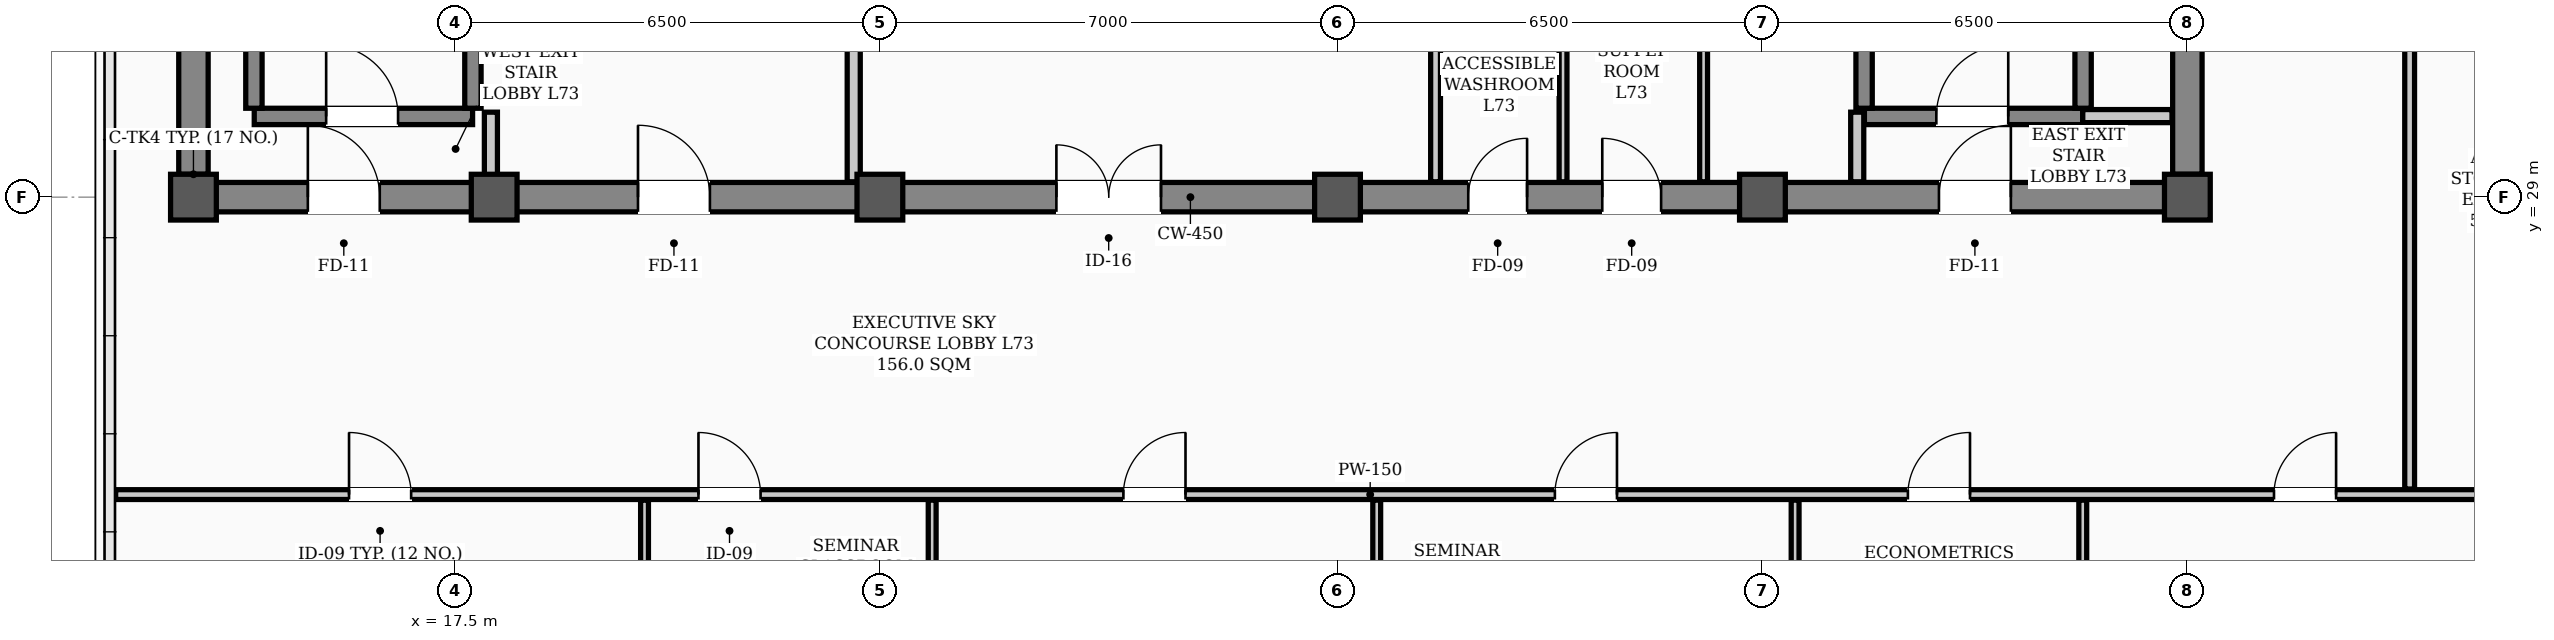
"""IFC4 building model, lengths in metres.
Left out: names, types, materials, properties, quantities, classifications, styles, units other than length and angle.
Written with IfcOpenShell. Run it as: python <this file> out.ifc"""

import sys

from ifc_helpers import new_model, si_unit, direction, frame, frame_2d, origin, origin_2d, place, context, subcontext, project, spatial, rectangle, hollow_rectangle, extrude, element, fill, save


model = new_model("IFC4")
c1 = context("Model", 3, precision=1e-05, world=origin(), true_north=direction((0.0, 1.0)))
c2 = subcontext(c1, "Body", "Model", "MODEL_VIEW")
j1 = project(units=[si_unit("LENGTHUNIT", "METRE"), si_unit("PLANEANGLEUNIT", "RADIAN")], contexts=[c1])
p1 = place(None, origin())
s1 = spatial("IfcSite", under=j1, at=p1, CompositionType="ELEMENT")
p2 = place(p1, origin())
s2 = spatial("IfcBuilding", under=s1, at=p2, CompositionType="ELEMENT")
p3 = place(p2, frame((0.0, 0.0, 293.0)))
s3 = spatial("IfcBuildingStorey", under=s2, at=p3, CompositionType="ELEMENT", Elevation=293.0)
for number, where, z_axis, x_axis in (
    (1, (13.5, 29.0, 0.0), (0.0, 0.0, 1.0), (1.0, 0.0, 0.0)),
    (2, (18.1, 29.0, 0.0), (0.0, 0.0, 1.0), (1.0, 0.0, 0.0)),
    (3, (24.0, 29.0, 0.0), (0.0, 0.0, 1.0), (1.0, 0.0, 0.0)),
    (4, (31.0, 29.0, 0.0), (0.0, 0.0, 1.0), (1.0, 0.0, 0.0)),
    (5, (37.5, 29.0, 0.0), (0.0, 0.0, 1.0), (1.0, 0.0, 0.0)),
    (6, (44.0, 29.0, 0.0), (0.0, 0.0, 1.0), (1.0, 0.0, 0.0)),
):
    element("IfcColumn", number, at=place(p3, frame(where, z_axis=z_axis, x_axis=x_axis)), inside=s3, PredefinedType="COLUMN", context=c2, shape_type="SweptSolid", body=[
        extrude(hollow_rectangle(XDim=0.7, YDim=0.7, WallThickness=0.028, InnerFilletRadius=0.014, OuterFilletRadius=0.042, at=origin_2d()), origin(), (0.0, 0.0, 1.0), 3.9),
    ])
p4 = place(p3, frame((13.5, 29.0, 0.0), z_axis=(0.0, 0.0, 1.0), x_axis=(1.0, 0.0, 0.0)))
e7 = element("IfcWall", 7, at=p4, inside=s3, PredefinedType="SHEAR", context=c2, shape_type="SweptSolid", body=[
    extrude(rectangle(XDim=30.5, YDim=0.45, at=frame_2d((15.25, 0.0))), origin(), (0.0, 0.0, 1.0), 3.72),
])
p5 = place(p4, frame((1.75, 0.0, 0.0)))
e8 = element("IfcOpeningElement", 8, at=p5, cuts=e7, PredefinedType="OPENING", context=c2, shape_type="SweptSolid", body=[
    extrude(rectangle(XDim=1.1, YDim=2.08, at=frame_2d((0.55, 1.04))), frame((0.0, 0.235, 0.0), z_axis=(0.0, -1.0, 0.0), x_axis=(1.0, 0.0, 0.0)), (0.0, 0.0, 1.0), 0.47),
])
p6 = place(p4, frame((26.7, 0.0, 0.0)))
e9 = element("IfcOpeningElement", 9, at=p6, cuts=e7, PredefinedType="OPENING", context=c2, shape_type="SweptSolid", body=[
    extrude(rectangle(XDim=1.1, YDim=2.08, at=frame_2d((0.55, 1.04))), frame((0.0, 0.235, 0.0), z_axis=(0.0, -1.0, 0.0), x_axis=(1.0, 0.0, 0.0)), (0.0, 0.0, 1.0), 0.47),
])
p7 = place(p4, frame((6.8, 0.0, 0.0)))
e10 = element("IfcOpeningElement", 10, at=p7, cuts=e7, PredefinedType="OPENING", context=c2, shape_type="SweptSolid", body=[
    extrude(rectangle(XDim=1.1, YDim=2.08, at=frame_2d((0.55, 1.04))), frame((0.0, 0.235, 0.0), z_axis=(0.0, -1.0, 0.0), x_axis=(1.0, 0.0, 0.0)), (0.0, 0.0, 1.0), 0.47),
])
p8 = place(p4, frame((13.2, 0.0, 0.0)))
e11 = element("IfcOpeningElement", 11, at=p8, cuts=e7, PredefinedType="OPENING", context=c2, shape_type="SweptSolid", body=[
    extrude(rectangle(XDim=1.6, YDim=2.08, at=frame_2d((0.8, 1.04))), frame((0.0, 0.235, 0.0), z_axis=(0.0, -1.0, 0.0), x_axis=(1.0, 0.0, 0.0)), (0.0, 0.0, 1.0), 0.47),
])
p9 = place(p4, frame((19.5, 0.0, 0.0)))
e12 = element("IfcOpeningElement", 12, at=p9, cuts=e7, PredefinedType="OPENING", context=c2, shape_type="SweptSolid", body=[
    extrude(rectangle(XDim=0.9, YDim=2.08, at=frame_2d((0.45, 1.04))), frame((0.0, 0.235, 0.0), z_axis=(0.0, -1.0, 0.0), x_axis=(1.0, 0.0, 0.0)), (0.0, 0.0, 1.0), 0.47),
])
p10 = place(p4, frame((21.55, 0.0, 0.0)))
e13 = element("IfcOpeningElement", 13, at=p10, cuts=e7, PredefinedType="OPENING", context=c2, shape_type="SweptSolid", body=[
    extrude(rectangle(XDim=0.9, YDim=2.08, at=frame_2d((0.45, 1.04))), frame((0.0, 0.235, 0.0), z_axis=(0.0, -1.0, 0.0), x_axis=(1.0, 0.0, 0.0)), (0.0, 0.0, 1.0), 0.47),
])
for number, where, z_axis, x_axis in (
    (14, (13.5, 29.35, 0.0), (0.0, 0.0, 1.0), (0.0, 1.0, 0.0)),
    (15, (44.0, 29.35, 0.0), (0.0, 0.0, 1.0), (0.0, 1.0, 0.0)),
):
    element("IfcWall", number, at=place(p3, frame(where, z_axis=z_axis, x_axis=x_axis)), inside=s3, PredefinedType="SHEAR", context=c2, shape_type="SweptSolid", body=[
        extrude(rectangle(XDim=8.6, YDim=0.45, at=frame_2d((4.3, 0.0))), origin(), (0.0, 0.0, 1.0), 3.72),
    ])
p11 = place(p3, frame((14.43, 30.235, 0.0), z_axis=(0.0, 0.0, 1.0), x_axis=(1.0, 0.0, 0.0)))
e16 = element("IfcWall", 16, at=p11, inside=s3, PredefinedType="STANDARD", context=c2, shape_type="SweptSolid", body=[
    extrude(rectangle(XDim=3.34, YDim=0.25, at=frame_2d((1.67, 0.0))), origin(), (0.0, 0.0, 1.0), 3.72),
])
p12 = place(p11, frame((1.1, 0.0, 0.0)))
e17 = element("IfcOpeningElement", 17, at=p12, cuts=e16, PredefinedType="OPENING", context=c2, shape_type="SweptSolid", body=[
    extrude(rectangle(XDim=1.1, YDim=2.08, at=frame_2d((0.55, 1.04))), frame((0.0, 0.135, 0.0), z_axis=(0.0, -1.0, 0.0), x_axis=(1.0, 0.0, 0.0)), (0.0, 0.0, 1.0), 0.27),
])
for number, where, z_axis, x_axis in (
    (18, (14.425, 30.36, 0.0), (0.0, 0.0, 1.0), (0.0, 1.0, 0.0)),
    (19, (17.775, 30.36, 0.0), (0.0, 0.0, 1.0), (0.0, 1.0, 0.0)),
):
    element("IfcWall", number, at=place(p3, frame(where, z_axis=z_axis, x_axis=x_axis)), inside=s3, PredefinedType="STANDARD", context=c2, shape_type="SweptSolid", body=[
        extrude(rectangle(XDim=7.184, YDim=0.25, at=frame_2d((3.592, 0.0))), origin(), (0.0, 0.0, 1.0), 3.72),
    ])
p13 = place(p3, frame((39.06, 30.235, 0.0), z_axis=(0.0, 0.0, 1.0), x_axis=(1.0, 0.0, 0.0)))
e20 = element("IfcWall", 20, at=p13, inside=s3, PredefinedType="STANDARD", context=c2, shape_type="SweptSolid", body=[
    extrude(rectangle(XDim=3.34, YDim=0.25, at=frame_2d((1.67, 0.0))), origin(), (0.0, 0.0, 1.0), 3.72),
])
p14 = place(p13, frame((1.1, 0.0, 0.0)))
e21 = element("IfcOpeningElement", 21, at=p14, cuts=e20, PredefinedType="OPENING", context=c2, shape_type="SweptSolid", body=[
    extrude(rectangle(XDim=1.1, YDim=2.08, at=frame_2d((0.55, 1.04))), frame((0.0, 0.135, 0.0), z_axis=(0.0, -1.0, 0.0), x_axis=(1.0, 0.0, 0.0)), (0.0, 0.0, 1.0), 0.27),
])
for number, where, z_axis, x_axis in (
    (22, (39.055, 30.36, 0.0), (0.0, 0.0, 1.0), (0.0, 1.0, 0.0)),
    (23, (42.405, 30.36, 0.0), (0.0, 0.0, 1.0), (0.0, 1.0, 0.0)),
):
    element("IfcWall", number, at=place(p3, frame(where, z_axis=z_axis, x_axis=x_axis)), inside=s3, PredefinedType="STANDARD", context=c2, shape_type="SweptSolid", body=[
        extrude(rectangle(XDim=7.184, YDim=0.25, at=frame_2d((3.592, 0.0))), origin(), (0.0, 0.0, 1.0), 3.72),
    ])
p15 = place(p3, frame((42.4, 30.24, 0.0), z_axis=(0.0, 0.0, 1.0), x_axis=(1.0, 0.0, 0.0)))
e24 = element("IfcWall", 24, at=p15, inside=s3, PredefinedType="STANDARD", context=c2, shape_type="SweptSolid", body=[
    extrude(rectangle(XDim=1.365, YDim=0.2, at=frame_2d((0.683, 0.0))), origin(), (0.0, 0.0, 1.0), 3.2),
])
p16 = place(p3, frame((12.31, 24.45, 0.0), z_axis=(0.0, 0.0, 1.0), x_axis=(1.0, 0.0, 0.0)))
e25 = element("IfcWall", 25, at=p16, inside=s3, PredefinedType="PARTITIONING", context=c2, shape_type="SweptSolid", body=[
    extrude(rectangle(XDim=38.38, YDim=0.15, at=frame_2d((19.19, 0.0))), origin(), (0.0, 0.0, 1.0), 3.2),
])
p17 = place(p16, frame((3.57, 0.0, 0.0)))
e26 = element("IfcOpeningElement", 26, at=p17, cuts=e25, PredefinedType="OPENING", context=c2, shape_type="SweptSolid", body=[
    extrude(rectangle(XDim=0.95, YDim=2.08, at=frame_2d((0.475, 1.04))), frame((0.0, 0.085, 0.0), z_axis=(0.0, -1.0, 0.0), x_axis=(1.0, 0.0, 0.0)), (0.0, 0.0, 1.0), 0.17),
])
p18 = place(p16, frame((8.915, 0.0, 0.0)))
e27 = element("IfcOpeningElement", 27, at=p18, cuts=e25, PredefinedType="OPENING", context=c2, shape_type="SweptSolid", body=[
    extrude(rectangle(XDim=0.95, YDim=2.08, at=frame_2d((0.475, 1.04))), frame((0.0, 0.085, 0.0), z_axis=(0.0, -1.0, 0.0), x_axis=(1.0, 0.0, 0.0)), (0.0, 0.0, 1.0), 0.17),
])
p19 = place(p16, frame((15.415, 0.0, 0.0)))
e28 = element("IfcOpeningElement", 28, at=p19, cuts=e25, PredefinedType="OPENING", context=c2, shape_type="SweptSolid", body=[
    extrude(rectangle(XDim=0.95, YDim=2.08, at=frame_2d((0.475, 1.04))), frame((0.0, 0.085, 0.0), z_axis=(0.0, -1.0, 0.0), x_axis=(1.0, 0.0, 0.0)), (0.0, 0.0, 1.0), 0.17),
])
p20 = place(p16, frame((22.015, 0.0, 0.0)))
e29 = element("IfcOpeningElement", 29, at=p20, cuts=e25, PredefinedType="OPENING", context=c2, shape_type="SweptSolid", body=[
    extrude(rectangle(XDim=0.95, YDim=2.08, at=frame_2d((0.475, 1.04))), frame((0.0, 0.085, 0.0), z_axis=(0.0, -1.0, 0.0), x_axis=(1.0, 0.0, 0.0)), (0.0, 0.0, 1.0), 0.17),
])
p21 = place(p16, frame((27.415, 0.0, 0.0)))
e30 = element("IfcOpeningElement", 30, at=p21, cuts=e25, PredefinedType="OPENING", context=c2, shape_type="SweptSolid", body=[
    extrude(rectangle(XDim=0.95, YDim=2.08, at=frame_2d((0.475, 1.04))), frame((0.0, 0.085, 0.0), z_axis=(0.0, -1.0, 0.0), x_axis=(1.0, 0.0, 0.0)), (0.0, 0.0, 1.0), 0.17),
])
p22 = place(p16, frame((33.015, 0.0, 0.0)))
e31 = element("IfcOpeningElement", 31, at=p22, cuts=e25, PredefinedType="OPENING", context=c2, shape_type="SweptSolid", body=[
    extrude(rectangle(XDim=0.95, YDim=2.08, at=frame_2d((0.475, 1.04))), frame((0.0, 0.085, 0.0), z_axis=(0.0, -1.0, 0.0), x_axis=(1.0, 0.0, 0.0)), (0.0, 0.0, 1.0), 0.17),
])
p23 = place(p3, frame((18.05, 29.235, 0.0), z_axis=(0.0, 0.0, 1.0), x_axis=(0.0, 1.0, 0.0)))
e32 = element("IfcWall", 32, at=p23, inside=s3, PredefinedType="STANDARD", context=c2, shape_type="SweptSolid", body=[
    extrude(rectangle(XDim=1.065, YDim=0.2, at=frame_2d((0.532, 0.0))), origin(), (0.0, 0.0, 1.0), 3.72),
])
p24 = place(p3, frame((38.95, 29.235, 0.0), z_axis=(0.0, 0.0, 1.0), x_axis=(0.0, 1.0, 0.0)))
e33 = element("IfcWall", 33, at=p24, inside=s3, PredefinedType="STANDARD", context=c2, shape_type="SweptSolid", body=[
    extrude(rectangle(XDim=1.065, YDim=0.2, at=frame_2d((0.532, 0.0))), origin(), (0.0, 0.0, 1.0), 3.4),
])
p25 = place(p3, frame((23.6, 29.235, 0.0), z_axis=(0.0, 0.0, 1.0), x_axis=(0.0, 1.0, 0.0)))
e34 = element("IfcWall", 34, at=p25, inside=s3, PredefinedType="STANDARD", context=c2, shape_type="SweptSolid", body=[
    extrude(rectangle(XDim=5.465, YDim=0.2, at=frame_2d((2.732, 0.0))), origin(), (0.0, 0.0, 1.0), 3.2),
])
p26 = place(p3, frame((32.5, 29.235, 0.0), z_axis=(0.0, 0.0, 1.0), x_axis=(0.0, 1.0, 0.0)))
e35 = element("IfcWall", 35, at=p26, inside=s3, PredefinedType="PARTITIONING", context=c2, shape_type="SweptSolid", body=[
    extrude(rectangle(XDim=2.53, YDim=0.15, at=frame_2d((1.265, 0.0))), origin(), (0.0, 0.0, 1.0), 3.4),
])
for number, where, z_axis, x_axis in (
    (36, (36.6, 29.235, 0.0), (0.0, 0.0, 1.0), (0.0, 1.0, 0.0)),
    (37, (34.45, 29.235, 0.0), (0.0, 0.0, 1.0), (0.0, 1.0, 0.0)),
):
    element("IfcWall", number, at=place(p3, frame(where, z_axis=z_axis, x_axis=x_axis)), inside=s3, PredefinedType="PARTITIONING", context=c2, shape_type="SweptSolid", body=[
        extrude(rectangle(XDim=2.53, YDim=0.12, at=frame_2d((1.265, 0.0))), origin(), (0.0, 0.0, 1.0), 3.4),
    ])
p27 = place(p3, frame((47.4, 24.535, 0.0), z_axis=(0.0, 0.0, 1.0), x_axis=(0.0, 1.0, 0.0)))
e38 = element("IfcWall", 38, at=p27, inside=s3, PredefinedType="PARTITIONING", context=c2, shape_type="SweptSolid", body=[
    extrude(rectangle(XDim=17.13, YDim=0.15, at=frame_2d((8.565, 0.0))), origin(), (0.0, 0.0, 1.0), 3.1),
])
p28 = place(p27, frame((8.09, 0.0, 0.0)))
e39 = element("IfcOpeningElement", 39, at=p28, cuts=e38, PredefinedType="OPENING", context=c2, shape_type="SweptSolid", body=[
    extrude(rectangle(XDim=0.95, YDim=2.08, at=frame_2d((0.475, 1.04))), frame((0.0, 0.085, 0.0), z_axis=(0.0, -1.0, 0.0), x_axis=(1.0, 0.0, 0.0)), (0.0, 0.0, 1.0), 0.17),
])
p29 = place(p3, frame((20.4, 18.71, 0.0), z_axis=(0.0, 0.0, 1.0), x_axis=(0.0, 1.0, 0.0)))
e40 = element("IfcWall", 40, at=p29, inside=s3, PredefinedType="PARTITIONING", context=c2, shape_type="SweptSolid", body=[
    extrude(rectangle(XDim=5.655, YDim=0.12, at=frame_2d((2.828, 0.0))), origin(), (0.0, 0.0, 1.0), 3.72),
])
p30 = place(p3, frame((24.8, 20.47, 0.0), z_axis=(0.0, 0.0, 1.0), x_axis=(0.0, 1.0, 0.0)))
e41 = element("IfcWall", 41, at=p30, inside=s3, PredefinedType="PARTITIONING", context=c2, shape_type="SweptSolid", body=[
    extrude(rectangle(XDim=3.895, YDim=0.12, at=frame_2d((1.948, 0.0))), origin(), (0.0, 0.0, 1.0), 3.1),
])
for number, where, z_axis, x_axis in (
    (42, (31.6, 18.71, 0.0), (0.0, 0.0, 1.0), (0.0, 1.0, 0.0)),
    (43, (38.0, 18.71, 0.0), (0.0, 0.0, 1.0), (0.0, 1.0, 0.0)),
    (44, (42.4, 18.71, 0.0), (0.0, 0.0, 1.0), (0.0, 1.0, 0.0)),
):
    element("IfcWall", number, at=place(p3, frame(where, z_axis=z_axis, x_axis=x_axis)), inside=s3, PredefinedType="PARTITIONING", context=c2, shape_type="SweptSolid", body=[
        extrude(rectangle(XDim=5.655, YDim=0.12, at=frame_2d((2.828, 0.0))), origin(), (0.0, 0.0, 1.0), 3.1),
    ])
p31 = place(p12, origin())
e45 = element("IfcDoor", 45, at=p31, inside=s3, OperationType="SINGLE_SWING_LEFT", PredefinedType="DOOR", context=c2, shape_type="SweptSolid", body=[
    extrude(rectangle(XDim=1.1, YDim=2.08, at=frame_2d((0.55, 1.04))), frame((0.0, 0.025, 0.0), z_axis=(0.0, -1.0, 0.0), x_axis=(1.0, 0.0, 0.0)), (0.0, 0.0, 1.0), 0.05),
])
fill(e17, e45)
p32 = place(p14, origin())
e46 = element("IfcDoor", 46, at=p32, inside=s3, OperationType="SINGLE_SWING_RIGHT", PredefinedType="DOOR", context=c2, shape_type="SweptSolid", body=[
    extrude(rectangle(XDim=1.1, YDim=2.08, at=frame_2d((0.55, 1.04))), frame((0.0, 0.025, 0.0), z_axis=(0.0, -1.0, 0.0), x_axis=(1.0, 0.0, 0.0)), (0.0, 0.0, 1.0), 0.05),
])
fill(e21, e46)
p33 = place(p5, origin())
e47 = element("IfcDoor", 47, at=p33, inside=s3, OperationType="SINGLE_SWING_LEFT", PredefinedType="DOOR", context=c2, shape_type="SweptSolid", body=[
    extrude(rectangle(XDim=1.1, YDim=2.08, at=frame_2d((0.55, 1.04))), frame((0.0, 0.025, 0.0), z_axis=(0.0, -1.0, 0.0), x_axis=(1.0, 0.0, 0.0)), (0.0, 0.0, 1.0), 0.05),
])
fill(e8, e47)
p34 = place(p6, origin())
e48 = element("IfcDoor", 48, at=p34, inside=s3, OperationType="SINGLE_SWING_RIGHT", PredefinedType="DOOR", context=c2, shape_type="SweptSolid", body=[
    extrude(rectangle(XDim=1.1, YDim=2.08, at=frame_2d((0.55, 1.04))), frame((0.0, 0.025, 0.0), z_axis=(0.0, -1.0, 0.0), x_axis=(1.0, 0.0, 0.0)), (0.0, 0.0, 1.0), 0.05),
])
fill(e9, e48)
p35 = place(p7, origin())
e49 = element("IfcDoor", 49, at=p35, inside=s3, OperationType="SINGLE_SWING_LEFT", PredefinedType="DOOR", context=c2, shape_type="SweptSolid", body=[
    extrude(rectangle(XDim=1.1, YDim=2.08, at=frame_2d((0.55, 1.04))), frame((0.0, 0.025, 0.0), z_axis=(0.0, -1.0, 0.0), x_axis=(1.0, 0.0, 0.0)), (0.0, 0.0, 1.0), 0.05),
])
fill(e10, e49)
p36 = place(p8, origin())
e50 = element("IfcDoor", 50, at=p36, inside=s3, OperationType="DOUBLE_DOOR_SINGLE_SWING", PredefinedType="DOOR", context=c2, shape_type="SweptSolid", body=[
    extrude(rectangle(XDim=1.6, YDim=2.08, at=frame_2d((0.8, 1.04))), frame((0.0, 0.025, 0.0), z_axis=(0.0, -1.0, 0.0), x_axis=(1.0, 0.0, 0.0)), (0.0, 0.0, 1.0), 0.05),
])
fill(e11, e50)
p37 = place(p9, origin())
e51 = element("IfcDoor", 51, at=p37, inside=s3, OperationType="SINGLE_SWING_RIGHT", PredefinedType="DOOR", context=c2, shape_type="SweptSolid", body=[
    extrude(rectangle(XDim=0.9, YDim=2.08, at=frame_2d((0.45, 1.04))), frame((0.0, 0.025, 0.0), z_axis=(0.0, -1.0, 0.0), x_axis=(1.0, 0.0, 0.0)), (0.0, 0.0, 1.0), 0.05),
])
fill(e12, e51)
p38 = place(p10, origin())
e52 = element("IfcDoor", 52, at=p38, inside=s3, OperationType="SINGLE_SWING_LEFT", PredefinedType="DOOR", context=c2, shape_type="SweptSolid", body=[
    extrude(rectangle(XDim=0.9, YDim=2.08, at=frame_2d((0.45, 1.04))), frame((0.0, 0.025, 0.0), z_axis=(0.0, -1.0, 0.0), x_axis=(1.0, 0.0, 0.0)), (0.0, 0.0, 1.0), 0.05),
])
fill(e13, e52)
p39 = place(p17, origin())
e53 = element("IfcDoor", 53, at=p39, inside=s3, OperationType="SINGLE_SWING_LEFT", PredefinedType="DOOR", context=c2, shape_type="SweptSolid", body=[
    extrude(rectangle(XDim=0.95, YDim=2.08, at=frame_2d((0.475, 1.04))), frame((0.0, 0.025, 0.0), z_axis=(0.0, -1.0, 0.0), x_axis=(1.0, 0.0, 0.0)), (0.0, 0.0, 1.0), 0.05),
])
fill(e26, e53)
p40 = place(p18, origin())
e54 = element("IfcDoor", 54, at=p40, inside=s3, OperationType="SINGLE_SWING_LEFT", PredefinedType="DOOR", context=c2, shape_type="SweptSolid", body=[
    extrude(rectangle(XDim=0.95, YDim=2.08, at=frame_2d((0.475, 1.04))), frame((0.0, 0.025, 0.0), z_axis=(0.0, -1.0, 0.0), x_axis=(1.0, 0.0, 0.0)), (0.0, 0.0, 1.0), 0.05),
])
fill(e27, e54)
p41 = place(p19, origin())
e55 = element("IfcDoor", 55, at=p41, inside=s3, OperationType="SINGLE_SWING_RIGHT", PredefinedType="DOOR", context=c2, shape_type="SweptSolid", body=[
    extrude(rectangle(XDim=0.95, YDim=2.08, at=frame_2d((0.475, 1.04))), frame((0.0, 0.025, 0.0), z_axis=(0.0, -1.0, 0.0), x_axis=(1.0, 0.0, 0.0)), (0.0, 0.0, 1.0), 0.05),
])
fill(e28, e55)
p42 = place(p20, origin())
e56 = element("IfcDoor", 56, at=p42, inside=s3, OperationType="SINGLE_SWING_RIGHT", PredefinedType="DOOR", context=c2, shape_type="SweptSolid", body=[
    extrude(rectangle(XDim=0.95, YDim=2.08, at=frame_2d((0.475, 1.04))), frame((0.0, 0.025, 0.0), z_axis=(0.0, -1.0, 0.0), x_axis=(1.0, 0.0, 0.0)), (0.0, 0.0, 1.0), 0.05),
])
fill(e29, e56)
p43 = place(p21, origin())
e57 = element("IfcDoor", 57, at=p43, inside=s3, OperationType="SINGLE_SWING_RIGHT", PredefinedType="DOOR", context=c2, shape_type="SweptSolid", body=[
    extrude(rectangle(XDim=0.95, YDim=2.08, at=frame_2d((0.475, 1.04))), frame((0.0, 0.025, 0.0), z_axis=(0.0, -1.0, 0.0), x_axis=(1.0, 0.0, 0.0)), (0.0, 0.0, 1.0), 0.05),
])
fill(e30, e57)
p44 = place(p22, origin())
e58 = element("IfcDoor", 58, at=p44, inside=s3, OperationType="SINGLE_SWING_RIGHT", PredefinedType="DOOR", context=c2, shape_type="SweptSolid", body=[
    extrude(rectangle(XDim=0.95, YDim=2.08, at=frame_2d((0.475, 1.04))), frame((0.0, 0.025, 0.0), z_axis=(0.0, -1.0, 0.0), x_axis=(1.0, 0.0, 0.0)), (0.0, 0.0, 1.0), 0.05),
])
fill(e31, e58)
save(model, sys.argv[1])
